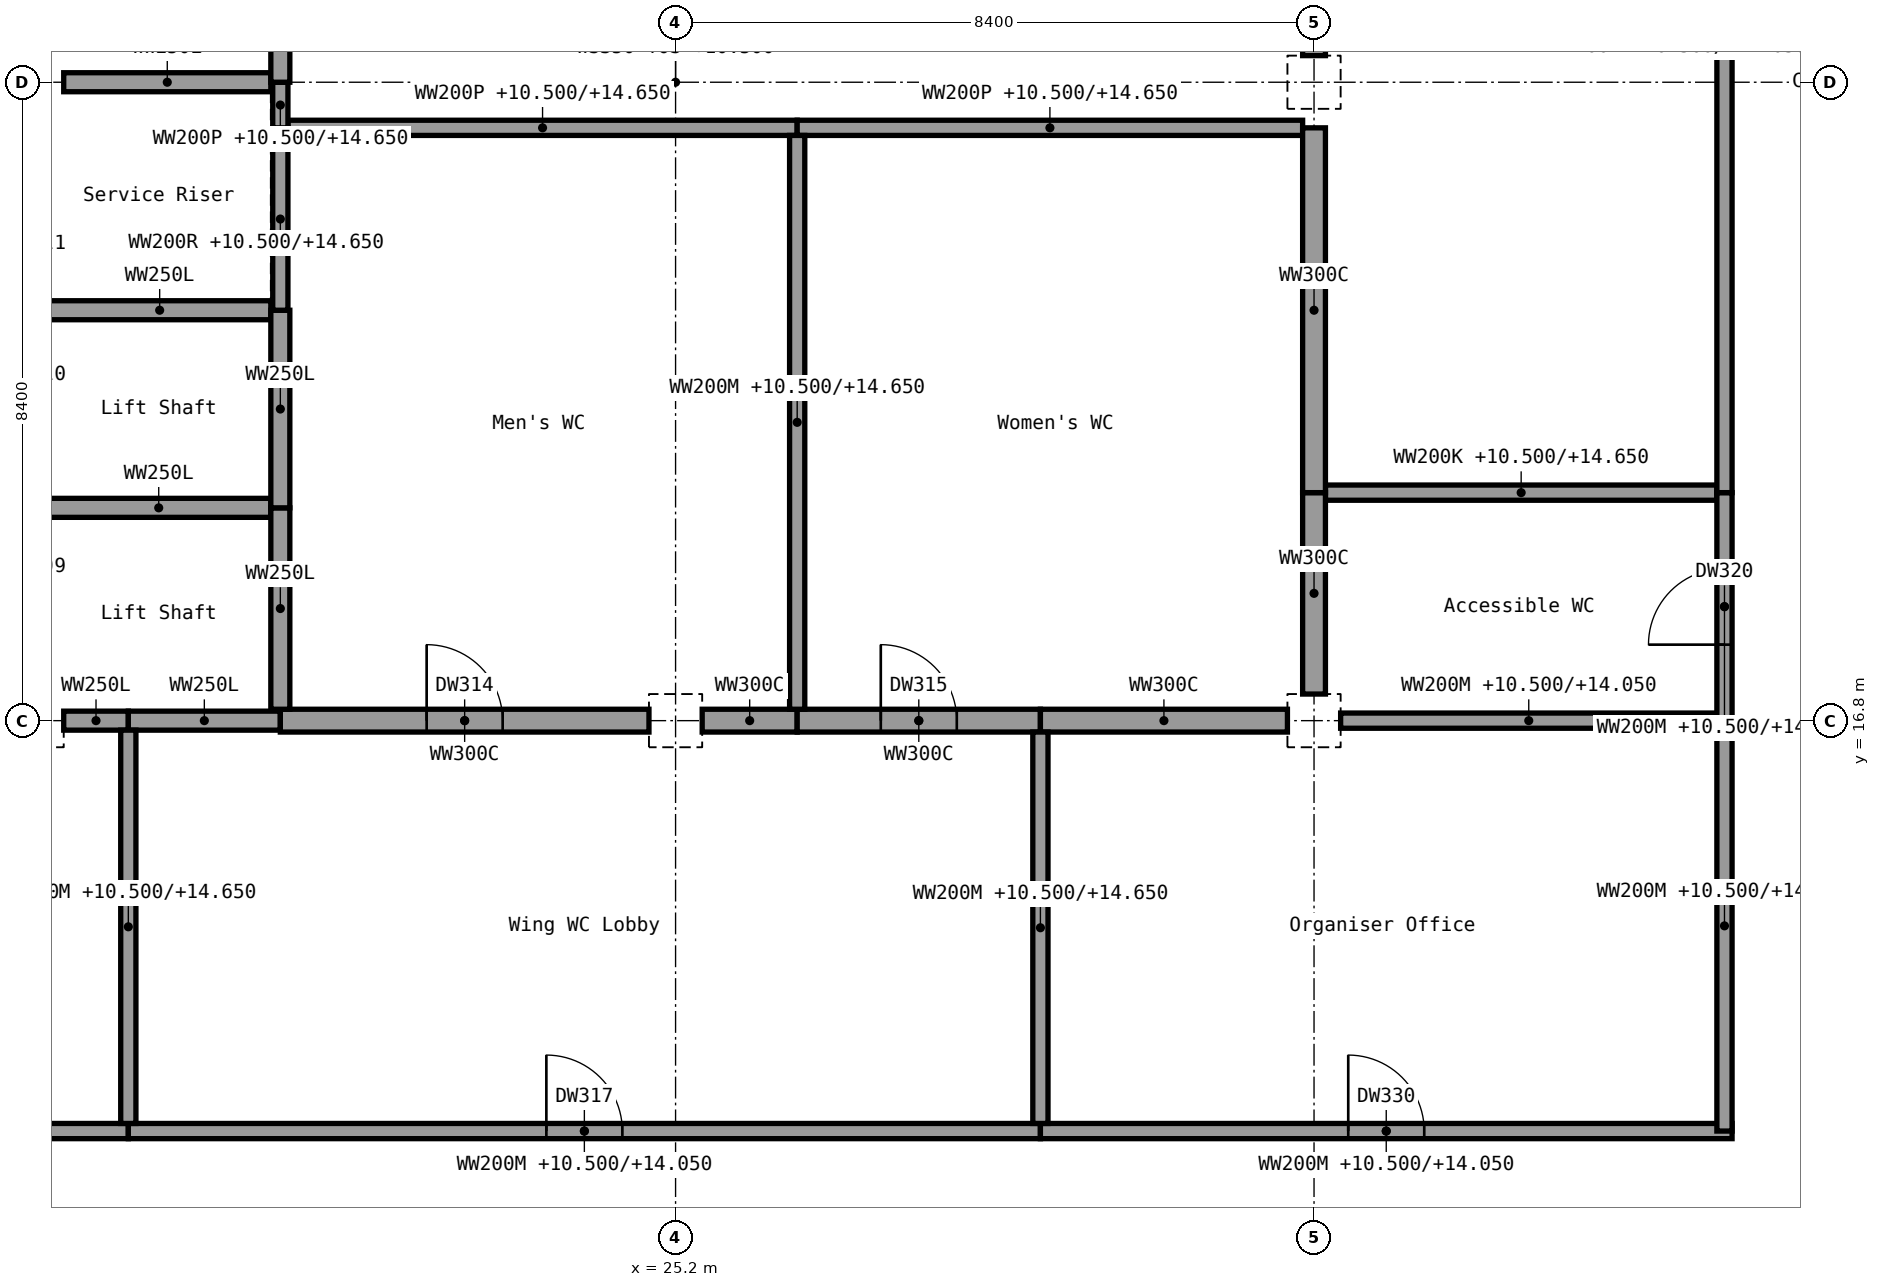
"""IFC4 building model, lengths in metres.
Left out: names, types, materials, properties, quantities, classifications, styles, units other than length and angle.
Written with IfcOpenShell. Run it as: python <this file> out.ifc"""

import sys

from ifc_helpers import new_model, si_unit, direction, frame, frame_2d, origin, origin_2d, place, context, subcontext, project, spatial, rectangle, extrude, element, fill, save


model = new_model("IFC4")
c1 = context("Model", 3, precision=1e-05, world=origin(), true_north=direction((0.0, 1.0)))
c2 = subcontext(c1, "Body", "Model", "MODEL_VIEW")
j1 = project(units=[si_unit("LENGTHUNIT", "METRE"), si_unit("PLANEANGLEUNIT", "RADIAN")], contexts=[c1])
p1 = place(None, origin())
s1 = spatial("IfcSite", under=j1, at=p1, CompositionType="ELEMENT")
p2 = place(p1, origin())
s2 = spatial("IfcBuilding", under=s1, at=p2, CompositionType="ELEMENT")
p3 = place(p2, frame((0.0, 0.0, 10.5)))
s3 = spatial("IfcBuildingStorey", under=s2, at=p3, CompositionType="ELEMENT", Elevation=10.5)
for number, where, z_axis, x_axis in (
    (1, (16.8, 16.8, 0.0), (0.0, 0.0, 1.0), (1.0, 0.0, 0.0)),
    (2, (16.8, 25.2, 0.0), (0.0, 0.0, 1.0), (1.0, 0.0, 0.0)),
    (3, (25.2, 16.8, 0.0), (0.0, 0.0, 1.0), (1.0, 0.0, 0.0)),
    (4, (33.6, 16.8, 0.0), (0.0, 0.0, 1.0), (1.0, 0.0, 0.0)),
    (5, (33.6, 25.2, 0.0), (0.0, 0.0, 1.0), (1.0, 0.0, 0.0)),
):
    element("IfcColumn", number, at=place(p3, frame(where, z_axis=z_axis, x_axis=x_axis)), inside=s3, PredefinedType="COLUMN", context=c2, shape_type="SweptSolid", body=[
        extrude(rectangle(XDim=0.7, YDim=0.7, at=origin_2d()), origin(), (0.0, 0.0, 1.0), 4.15),
    ])
p4 = place(p3, frame((11.3, 11.4, 0.0), z_axis=(0.0, 0.0, 1.0), x_axis=(1.0, 0.0, 0.0)))
e6 = element("IfcWall", 6, at=p4, inside=s3, PredefinedType="PARTITIONING", context=c2, shape_type="SweptSolid", body=[
    extrude(rectangle(XDim=6.7, YDim=0.2, at=frame_2d((3.35, 0.0))), origin(), (0.0, 0.0, 1.0), 3.55),
])
p5 = place(p4, frame((2.85, 0.0, 0.0)))
e7 = element("IfcOpeningElement", 7, at=p5, cuts=e6, PredefinedType="OPENING", context=c2, shape_type="SweptSolid", body=[
    extrude(rectangle(XDim=1.0, YDim=2.1, at=frame_2d((0.5, 1.05))), frame((0.0, 0.1, 0.0), z_axis=(0.0, -1.0, 0.0), x_axis=(1.0, 0.0, 0.0)), (0.0, 0.0, 1.0), 0.2),
])
p6 = place(p3, frame((18.0, 11.4, 0.0), z_axis=(0.0, 0.0, 1.0), x_axis=(1.0, 0.0, 0.0)))
e8 = element("IfcWall", 8, at=p6, inside=s3, PredefinedType="PARTITIONING", context=c2, shape_type="SweptSolid", body=[
    extrude(rectangle(XDim=12.0, YDim=0.2, at=frame_2d((6.0, 0.0))), origin(), (0.0, 0.0, 1.0), 3.55),
])
p7 = place(p6, frame((5.5, 0.0, 0.0)))
e9 = element("IfcOpeningElement", 9, at=p7, cuts=e8, PredefinedType="OPENING", context=c2, shape_type="SweptSolid", body=[
    extrude(rectangle(XDim=1.0, YDim=2.1, at=frame_2d((0.5, 1.05))), frame((0.0, 0.1, 0.0), z_axis=(0.0, -1.0, 0.0), x_axis=(1.0, 0.0, 0.0)), (0.0, 0.0, 1.0), 0.2),
])
p8 = place(p3, frame((30.0, 11.4, 0.0), z_axis=(0.0, 0.0, 1.0), x_axis=(1.0, 0.0, 0.0)))
e10 = element("IfcWall", 10, at=p8, inside=s3, PredefinedType="PARTITIONING", context=c2, shape_type="SweptSolid", body=[
    extrude(rectangle(XDim=9.1, YDim=0.2, at=frame_2d((4.55, 0.0))), origin(), (0.0, 0.0, 1.0), 3.55),
])
p9 = place(p8, frame((4.05, 0.0, 0.0)))
e11 = element("IfcOpeningElement", 11, at=p9, cuts=e10, PredefinedType="OPENING", context=c2, shape_type="SweptSolid", body=[
    extrude(rectangle(XDim=1.0, YDim=2.1, at=frame_2d((0.5, 1.05))), frame((0.0, 0.1, 0.0), z_axis=(0.0, -1.0, 0.0), x_axis=(1.0, 0.0, 0.0)), (0.0, 0.0, 1.0), 0.2),
])
p10 = place(p3, frame((17.15, 16.8, 0.0), z_axis=(0.0, 0.0, 1.0), x_axis=(1.0, 0.0, 0.0)))
e12 = element("IfcWall", 12, at=p10, inside=s3, PredefinedType="SHEAR", context=c2, shape_type="SweptSolid", body=[
    extrude(rectangle(XDim=0.85, YDim=0.25, at=frame_2d((0.425, 0.0))), origin(), (0.0, 0.0, 1.0), 4.15),
])
p11 = place(p3, frame((18.0, 16.8, 0.0), z_axis=(0.0, 0.0, 1.0), x_axis=(1.0, 0.0, 0.0)))
e13 = element("IfcWall", 13, at=p11, inside=s3, PredefinedType="SHEAR", context=c2, shape_type="SweptSolid", body=[
    extrude(rectangle(XDim=2.0, YDim=0.25, at=frame_2d((1.0, 0.0))), origin(), (0.0, 0.0, 1.0), 4.15),
])
p12 = place(p3, frame((20.0, 16.8, 0.0), z_axis=(0.0, 0.0, 1.0), x_axis=(1.0, 0.0, 0.0)))
e14 = element("IfcWall", 14, at=p12, inside=s3, PredefinedType="SHEAR", context=c2, shape_type="SweptSolid", body=[
    extrude(rectangle(XDim=4.85, YDim=0.3, at=frame_2d((2.425, 0.0))), origin(), (0.0, 0.0, 1.0), 4.15),
])
p13 = place(p12, frame((1.925, 0.0, 0.0)))
e15 = element("IfcOpeningElement", 15, at=p13, cuts=e14, PredefinedType="OPENING", context=c2, shape_type="SweptSolid", body=[
    extrude(rectangle(XDim=1.0, YDim=2.1, at=frame_2d((0.5, 1.05))), frame((0.0, 0.15, 0.0), z_axis=(0.0, -1.0, 0.0), x_axis=(1.0, 0.0, 0.0)), (0.0, 0.0, 1.0), 0.3),
])
p14 = place(p3, frame((25.55, 16.8, 0.0), z_axis=(0.0, 0.0, 1.0), x_axis=(1.0, 0.0, 0.0)))
e16 = element("IfcWall", 16, at=p14, inside=s3, PredefinedType="SHEAR", context=c2, shape_type="SweptSolid", body=[
    extrude(rectangle(XDim=1.25, YDim=0.3, at=frame_2d((0.625, 0.0))), origin(), (0.0, 0.0, 1.0), 4.15),
])
p15 = place(p3, frame((26.8, 16.8, 0.0), z_axis=(0.0, 0.0, 1.0), x_axis=(1.0, 0.0, 0.0)))
e17 = element("IfcWall", 17, at=p15, inside=s3, PredefinedType="SHEAR", context=c2, shape_type="SweptSolid", body=[
    extrude(rectangle(XDim=3.2, YDim=0.3, at=frame_2d((1.6, 0.0))), origin(), (0.0, 0.0, 1.0), 4.15),
])
p16 = place(p15, frame((1.1, 0.0, 0.0)))
e18 = element("IfcOpeningElement", 18, at=p16, cuts=e17, PredefinedType="OPENING", context=c2, shape_type="SweptSolid", body=[
    extrude(rectangle(XDim=1.0, YDim=2.1, at=frame_2d((0.5, 1.05))), frame((0.0, 0.15, 0.0), z_axis=(0.0, -1.0, 0.0), x_axis=(1.0, 0.0, 0.0)), (0.0, 0.0, 1.0), 0.3),
])
p17 = place(p3, frame((30.0, 16.8, 0.0), z_axis=(0.0, 0.0, 1.0), x_axis=(1.0, 0.0, 0.0)))
e19 = element("IfcWall", 19, at=p17, inside=s3, PredefinedType="SHEAR", context=c2, shape_type="SweptSolid", body=[
    extrude(rectangle(XDim=3.25, YDim=0.3, at=frame_2d((1.625, 0.0))), origin(), (0.0, 0.0, 1.0), 4.15),
])
p18 = place(p3, frame((33.95, 16.8, 0.0), z_axis=(0.0, 0.0, 1.0), x_axis=(1.0, 0.0, 0.0)))
e20 = element("IfcWall", 20, at=p18, inside=s3, PredefinedType="PARTITIONING", context=c2, shape_type="SweptSolid", body=[
    extrude(rectangle(XDim=4.95, YDim=0.2, at=frame_2d((2.475, 0.0))), origin(), (0.0, 0.0, 1.0), 3.55),
])
p19 = place(p3, frame((16.925, 19.6, 0.0), z_axis=(0.0, 0.0, 1.0), x_axis=(1.0, 0.0, 0.0)))
e21 = element("IfcWall", 21, at=p19, inside=s3, PredefinedType="SHEAR", context=c2, shape_type="SweptSolid", body=[
    extrude(rectangle(XDim=2.95, YDim=0.25, at=frame_2d((1.475, 0.0))), origin(), (0.0, 0.0, 1.0), 4.15),
])
p20 = place(p3, frame((33.75, 19.8, 0.0), z_axis=(0.0, 0.0, 1.0), x_axis=(1.0, 0.0, 0.0)))
e22 = element("IfcWall", 22, at=p20, inside=s3, PredefinedType="SOLIDWALL", context=c2, shape_type="SweptSolid", body=[
    extrude(rectangle(XDim=5.15, YDim=0.2, at=frame_2d((2.575, 0.0))), origin(), (0.0, 0.0, 1.0), 4.15),
])
p21 = place(p3, frame((16.95, 22.2, 0.0), z_axis=(0.0, 0.0, 1.0), x_axis=(1.0, 0.0, 0.0)))
e23 = element("IfcWall", 23, at=p21, inside=s3, PredefinedType="SHEAR", context=c2, shape_type="SweptSolid", body=[
    extrude(rectangle(XDim=2.925, YDim=0.25, at=frame_2d((1.462, 0.0))), origin(), (0.0, 0.0, 1.0), 4.15),
])
p22 = place(p3, frame((20.1, 24.6, 0.0), z_axis=(0.0, 0.0, 1.0), x_axis=(1.0, 0.0, 0.0)))
e24 = element("IfcWall", 24, at=p22, inside=s3, PredefinedType="SOLIDWALL", context=c2, shape_type="SweptSolid", body=[
    extrude(rectangle(XDim=6.7, YDim=0.2, at=frame_2d((3.35, 0.0))), origin(), (0.0, 0.0, 1.0), 4.15),
])
p23 = place(p3, frame((26.8, 24.6, 0.0), z_axis=(0.0, 0.0, 1.0), x_axis=(1.0, 0.0, 0.0)))
e25 = element("IfcWall", 25, at=p23, inside=s3, PredefinedType="SOLIDWALL", context=c2, shape_type="SweptSolid", body=[
    extrude(rectangle(XDim=6.65, YDim=0.2, at=frame_2d((3.325, 0.0))), origin(), (0.0, 0.0, 1.0), 4.15),
])
p24 = place(p3, frame((17.15, 25.2, 0.0), z_axis=(0.0, 0.0, 1.0), x_axis=(1.0, 0.0, 0.0)))
e26 = element("IfcWall", 26, at=p24, inside=s3, PredefinedType="SHEAR", context=c2, shape_type="SweptSolid", body=[
    extrude(rectangle(XDim=2.725, YDim=0.25, at=frame_2d((1.363, 0.0))), origin(), (0.0, 0.0, 1.0), 4.15),
])
p25 = place(p3, frame((18.0, 11.5, 0.0), z_axis=(0.0, 0.0, 1.0), x_axis=(0.0, 1.0, 0.0)))
e27 = element("IfcWall", 27, at=p25, inside=s3, PredefinedType="PARTITIONING", context=c2, shape_type="SweptSolid", body=[
    extrude(rectangle(XDim=5.175, YDim=0.2, at=frame_2d((2.587, 0.0))), origin(), (0.0, 0.0, 1.0), 4.15),
])
p26 = place(p3, frame((20.0, 16.95, 0.0), z_axis=(0.0, 0.0, 1.0), x_axis=(0.0, 1.0, 0.0)))
e28 = element("IfcWall", 28, at=p26, inside=s3, PredefinedType="SHEAR", context=c2, shape_type="SweptSolid", body=[
    extrude(rectangle(XDim=2.65, YDim=0.25, at=frame_2d((1.325, 0.0))), origin(), (0.0, 0.0, 1.0), 4.15),
])
p27 = place(p3, frame((20.0, 19.6, 0.0), z_axis=(0.0, 0.0, 1.0), x_axis=(0.0, 1.0, 0.0)))
e29 = element("IfcWall", 29, at=p27, inside=s3, PredefinedType="SHEAR", context=c2, shape_type="SweptSolid", body=[
    extrude(rectangle(XDim=2.6, YDim=0.25, at=frame_2d((1.3, 0.0))), origin(), (0.0, 0.0, 1.0), 4.15),
])
p28 = place(p3, frame((20.0, 22.2, 0.0), z_axis=(0.0, 0.0, 1.0), x_axis=(0.0, 1.0, 0.0)))
e30 = element("IfcWall", 30, at=p28, inside=s3, PredefinedType="SOLIDWALL", context=c2, shape_type="SweptSolid", body=[
    extrude(rectangle(XDim=2.4, YDim=0.2, at=frame_2d((1.2, 0.0))), origin(), (0.0, 0.0, 1.0), 4.15),
])
p29 = place(p3, frame((20.0, 24.6, 0.0), z_axis=(0.0, 0.0, 1.0), x_axis=(0.0, 1.0, 0.0)))
e31 = element("IfcWall", 31, at=p29, inside=s3, PredefinedType="SOLIDWALL", context=c2, shape_type="SweptSolid", body=[
    extrude(rectangle(XDim=0.6, YDim=0.2, at=frame_2d((0.3, 0.0))), origin(), (0.0, 0.0, 1.0), 4.15),
])
p30 = place(p3, frame((20.0, 25.2, 0.0), z_axis=(0.0, 0.0, 1.0), x_axis=(0.0, 1.0, 0.0)))
e32 = element("IfcWall", 32, at=p30, inside=s3, PredefinedType="SHEAR", context=c2, shape_type="SweptSolid", body=[
    extrude(rectangle(XDim=2.6, YDim=0.25, at=frame_2d((1.3, 0.0))), origin(), (0.0, 0.0, 1.0), 4.15),
])
p31 = place(p3, frame((26.8, 16.95, 0.0), z_axis=(0.0, 0.0, 1.0), x_axis=(0.0, 1.0, 0.0)))
e33 = element("IfcWall", 33, at=p31, inside=s3, PredefinedType="PARTITIONING", context=c2, shape_type="SweptSolid", body=[
    extrude(rectangle(XDim=7.55, YDim=0.2, at=frame_2d((3.775, 0.0))), origin(), (0.0, 0.0, 1.0), 4.15),
])
p32 = place(p3, frame((30.0, 11.5, 0.0), z_axis=(0.0, 0.0, 1.0), x_axis=(0.0, 1.0, 0.0)))
e34 = element("IfcWall", 34, at=p32, inside=s3, PredefinedType="PARTITIONING", context=c2, shape_type="SweptSolid", body=[
    extrude(rectangle(XDim=5.15, YDim=0.2, at=frame_2d((2.575, 0.0))), origin(), (0.0, 0.0, 1.0), 4.15),
])
p33 = place(p3, frame((33.6, 17.15, 0.0), z_axis=(0.0, 0.0, 1.0), x_axis=(0.0, 1.0, 0.0)))
e35 = element("IfcWall", 35, at=p33, inside=s3, PredefinedType="SHEAR", context=c2, shape_type="SweptSolid", body=[
    extrude(rectangle(XDim=2.65, YDim=0.3, at=frame_2d((1.325, 0.0))), origin(), (0.0, 0.0, 1.0), 4.15),
])
p34 = place(p3, frame((33.6, 19.8, 0.0), z_axis=(0.0, 0.0, 1.0), x_axis=(0.0, 1.0, 0.0)))
e36 = element("IfcWall", 36, at=p34, inside=s3, PredefinedType="SHEAR", context=c2, shape_type="SweptSolid", body=[
    extrude(rectangle(XDim=4.8, YDim=0.3, at=frame_2d((2.4, 0.0))), origin(), (0.0, 0.0, 1.0), 4.15),
])
p35 = place(p3, frame((33.6, 25.55, 0.0), z_axis=(0.0, 0.0, 1.0), x_axis=(0.0, 1.0, 0.0)))
e37 = element("IfcWall", 37, at=p35, inside=s3, PredefinedType="SHEAR", context=c2, shape_type="SweptSolid", body=[
    extrude(rectangle(XDim=7.7, YDim=0.3, at=frame_2d((3.85, 0.0))), origin(), (0.0, 0.0, 1.0), 4.15),
])
p36 = place(p3, frame((39.0, 11.4, 0.0), z_axis=(0.0, 0.0, 1.0), x_axis=(0.0, 1.0, 0.0)))
e38 = element("IfcWall", 38, at=p36, inside=s3, PredefinedType="PARTITIONING", context=c2, shape_type="SweptSolid", body=[
    extrude(rectangle(XDim=5.4, YDim=0.2, at=frame_2d((2.7, 0.0))), origin(), (0.0, 0.0, 1.0), 3.55),
])
p37 = place(p3, frame((39.0, 16.8, 0.0), z_axis=(0.0, 0.0, 1.0), x_axis=(0.0, 1.0, 0.0)))
e39 = element("IfcWall", 39, at=p37, inside=s3, PredefinedType="PARTITIONING", context=c2, shape_type="SweptSolid", body=[
    extrude(rectangle(XDim=3.0, YDim=0.2, at=frame_2d((1.5, 0.0))), origin(), (0.0, 0.0, 1.0), 3.55),
])
p38 = place(p37, frame((1.0, 0.0, 0.0)))
e40 = element("IfcOpeningElement", 40, at=p38, cuts=e39, PredefinedType="OPENING", context=c2, shape_type="SweptSolid", body=[
    extrude(rectangle(XDim=1.0, YDim=2.1, at=frame_2d((0.5, 1.05))), frame((0.0, 0.1, 0.0), z_axis=(0.0, -1.0, 0.0), x_axis=(1.0, 0.0, 0.0)), (0.0, 0.0, 1.0), 0.2),
])
p39 = place(p3, frame((39.0, 19.8, 0.0), z_axis=(0.0, 0.0, 1.0), x_axis=(0.0, 1.0, 0.0)))
e41 = element("IfcWall", 41, at=p39, inside=s3, PredefinedType="SOLIDWALL", context=c2, shape_type="SweptSolid", body=[
    extrude(rectangle(XDim=13.8, YDim=0.2, at=frame_2d((6.9, 0.0))), origin(), (0.0, 0.0, 1.0), 3.55),
])
p40 = place(p39, frame((6.4, 0.0, 0.0)))
e42 = element("IfcOpeningElement", 42, at=p40, cuts=e41, PredefinedType="OPENING", context=c2, shape_type="SweptSolid", body=[
    extrude(rectangle(XDim=1.0, YDim=2.1, at=frame_2d((0.5, 1.05))), frame((0.0, 0.1, 0.0), z_axis=(0.0, -1.0, 0.0), x_axis=(1.0, 0.0, 0.0)), (0.0, 0.0, 1.0), 0.2),
])
p41 = place(p13, origin())
e43 = element("IfcDoor", 43, at=p41, inside=s3, OperationType="SINGLE_SWING_LEFT", PredefinedType="DOOR", context=c2, shape_type="SweptSolid", body=[
    extrude(rectangle(XDim=1.0, YDim=2.1, at=frame_2d((0.5, 1.05))), frame((0.0, 0.025, 0.0), z_axis=(0.0, -1.0, 0.0), x_axis=(1.0, 0.0, 0.0)), (0.0, 0.0, 1.0), 0.05),
])
fill(e15, e43)
p42 = place(p16, origin())
e44 = element("IfcDoor", 44, at=p42, inside=s3, OperationType="SINGLE_SWING_LEFT", PredefinedType="DOOR", context=c2, shape_type="SweptSolid", body=[
    extrude(rectangle(XDim=1.0, YDim=2.1, at=frame_2d((0.5, 1.05))), frame((0.0, 0.025, 0.0), z_axis=(0.0, -1.0, 0.0), x_axis=(1.0, 0.0, 0.0)), (0.0, 0.0, 1.0), 0.05),
])
fill(e18, e44)
p43 = place(p7, origin())
e45 = element("IfcDoor", 45, at=p43, inside=s3, OperationType="SINGLE_SWING_LEFT", PredefinedType="DOOR", context=c2, shape_type="SweptSolid", body=[
    extrude(rectangle(XDim=1.0, YDim=2.1, at=frame_2d((0.5, 1.05))), frame((0.0, 0.025, 0.0), z_axis=(0.0, -1.0, 0.0), x_axis=(1.0, 0.0, 0.0)), (0.0, 0.0, 1.0), 0.05),
])
fill(e9, e45)
p44 = place(p38, origin())
e46 = element("IfcDoor", 46, at=p44, inside=s3, OperationType="SINGLE_SWING_LEFT", PredefinedType="DOOR", context=c2, shape_type="SweptSolid", body=[
    extrude(rectangle(XDim=1.0, YDim=2.1, at=frame_2d((0.5, 1.05))), frame((0.0, 0.025, 0.0), z_axis=(0.0, -1.0, 0.0), x_axis=(1.0, 0.0, 0.0)), (0.0, 0.0, 1.0), 0.05),
])
fill(e40, e46)
p45 = place(p9, origin())
e47 = element("IfcDoor", 47, at=p45, inside=s3, OperationType="SINGLE_SWING_LEFT", PredefinedType="DOOR", context=c2, shape_type="SweptSolid", body=[
    extrude(rectangle(XDim=1.0, YDim=2.1, at=frame_2d((0.5, 1.05))), frame((0.0, 0.025, 0.0), z_axis=(0.0, -1.0, 0.0), x_axis=(1.0, 0.0, 0.0)), (0.0, 0.0, 1.0), 0.05),
])
fill(e11, e47)
save(model, sys.argv[1])
